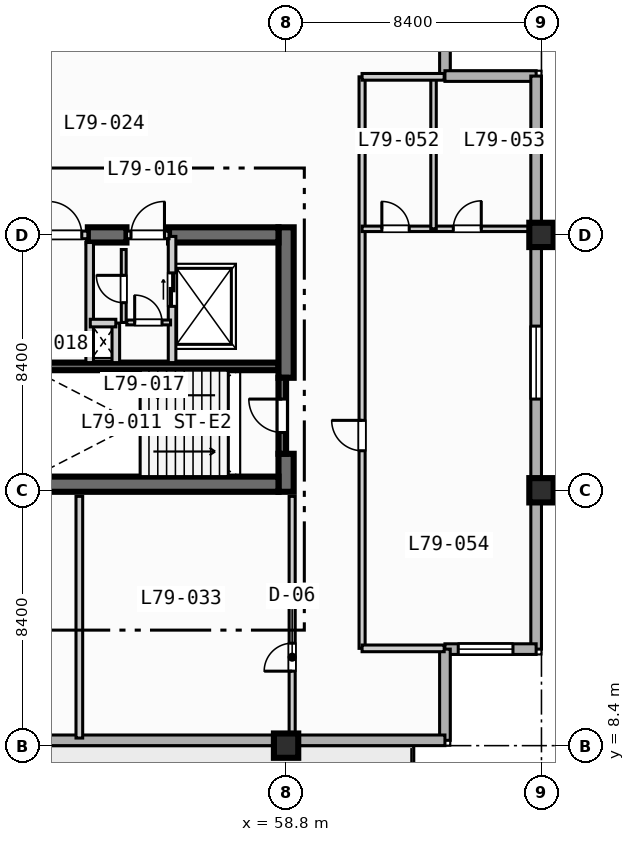
"""IFC4 building model, lengths in metres.
Left out: names, types, materials, properties, quantities, classifications, styles, units other than length and angle.
Written with IfcOpenShell. Run it as: python <this file> out.ifc"""

import sys

from ifc_helpers import new_model, si_unit, direction, frame, frame_2d, origin, origin_2d, place, context, subcontext, project, spatial, rectangle, extrude, element, fill, save


model = new_model("IFC4")
c1 = context("Model", 3, precision=1e-05, world=origin(), true_north=direction((0.0, 1.0)))
c2 = subcontext(c1, "Body", "Model", "MODEL_VIEW")
j1 = project(units=[si_unit("LENGTHUNIT", "METRE"), si_unit("PLANEANGLEUNIT", "RADIAN")], contexts=[c1])
p1 = place(None, origin())
s1 = spatial("IfcSite", under=j1, at=p1, CompositionType="ELEMENT")
p2 = place(p1, origin())
s2 = spatial("IfcBuilding", under=s1, at=p2, CompositionType="ELEMENT")
p3 = place(p2, frame((0.0, 0.0, 320.3)))
s3 = spatial("IfcBuildingStorey", under=s2, at=p3, CompositionType="ELEMENT", Elevation=320.3)
p4 = place(p3, frame((50.5, 20.875, 0.0), z_axis=(0.0, 0.0, 1.0), x_axis=(1.0, 0.0, 0.0)))
e1 = element("IfcWall", 1, at=p4, inside=s3, PredefinedType="SOLIDWALL", context=c2, shape_type="SweptSolid", body=[
    extrude(rectangle(XDim=8.05, YDim=0.25, at=frame_2d((4.025, 0.0))), origin(), (0.0, 0.0, 1.0), 3.67),
])
p5 = place(p3, frame((58.8, 16.75, 0.0), z_axis=(0.0, 0.0, 1.0), x_axis=(0.0, 1.0, 0.0)))
e2 = element("IfcWall", 2, at=p5, inside=s3, PredefinedType="SHEAR", context=c2, shape_type="SweptSolid", body=[
    extrude(rectangle(XDim=1.25, YDim=0.5, at=frame_2d((0.625, 0.0))), origin(), (0.0, 0.0, 1.0), 3.67),
])
p6 = place(p3, frame((58.8, 20.5, 0.0), z_axis=(0.0, 0.0, 1.0), x_axis=(0.0, 1.0, 0.0)))
e3 = element("IfcWall", 3, at=p6, inside=s3, PredefinedType="SHEAR", context=c2, shape_type="SweptSolid", body=[
    extrude(rectangle(XDim=4.95, YDim=0.5, at=frame_2d((2.475, 0.0))), origin(), (0.0, 0.0, 1.0), 3.67),
])
p7 = place(p3, frame((42.2, 17.0, 0.0), z_axis=(0.0, 0.0, 1.0), x_axis=(1.0, 0.0, 0.0)))
e4 = element("IfcWall", 4, at=p7, inside=s3, PredefinedType="SHEAR", context=c2, shape_type="SweptSolid", body=[
    extrude(rectangle(XDim=16.35, YDim=0.5, at=frame_2d((8.175, 0.0))), origin(), (0.0, 0.0, 1.0), 3.67),
])
p8 = place(p3, frame((52.28, 25.2, 0.0), z_axis=(0.0, 0.0, 1.0), x_axis=(1.0, 0.0, 0.0)))
e5 = element("IfcWall", 5, at=p8, inside=s3, PredefinedType="SHEAR", context=c2, shape_type="SweptSolid", body=[
    extrude(rectangle(XDim=1.27, YDim=0.5, at=frame_2d((0.635, 0.0))), origin(), (0.0, 0.0, 1.0), 3.67),
])
p9 = place(p3, frame((54.95, 25.2, 0.0), z_axis=(0.0, 0.0, 1.0), x_axis=(1.0, 0.0, 0.0)))
e6 = element("IfcWall", 6, at=p9, inside=s3, PredefinedType="SHEAR", context=c2, shape_type="SweptSolid", body=[
    extrude(rectangle(XDim=3.6, YDim=0.5, at=frame_2d((1.8, 0.0))), origin(), (0.0, 0.0, 1.0), 3.67),
])
for number, where, z_axis, x_axis in (
    (7, (58.8, 8.4, 0.0), (0.0, 0.0, 1.0), (1.0, 0.0, 0.0)),
    (8, (67.2, 16.8, 0.0), (0.0, 0.0, 1.0), (1.0, 0.0, 0.0)),
    (9, (67.2, 25.2, 0.0), (0.0, 0.0, 1.0), (1.0, 0.0, 0.0)),
):
    element("IfcColumn", number, at=place(p3, frame(where, z_axis=z_axis, x_axis=x_axis)), inside=s3, PredefinedType="COLUMN", context=c2, shape_type="SweptSolid", body=[
        extrude(rectangle(XDim=0.8, YDim=0.8, at=origin_2d()), origin(), (0.0, 0.0, 1.0), 3.9),
    ])
for number, where, z_axis, x_axis in (
    (10, (64.025, 33.425, 0.0), (0.0, 0.0, 1.0), (0.0, -1.0, 0.0)),
    (11, (64.025, 30.425, 0.0), (0.0, 0.0, 1.0), (1.0, 0.0, 0.0)),
):
    element("IfcWall", number, at=place(p3, frame(where, z_axis=z_axis, x_axis=x_axis)), inside=s3, PredefinedType="STANDARD", context=c2, shape_type="SweptSolid", body=[
        extrude(rectangle(XDim=3.0, YDim=0.35, at=frame_2d((1.5, 0.0))), origin(), (0.0, 0.0, 1.0), 3.67),
    ])
p10 = place(p3, frame((67.025, 30.425, 0.0), z_axis=(0.0, 0.0, 1.0), x_axis=(0.0, -1.0, 0.0)))
e12 = element("IfcWall", 12, at=p10, inside=s3, PredefinedType="STANDARD", context=c2, shape_type="SweptSolid", body=[
    extrude(rectangle(XDim=18.85, YDim=0.35, at=frame_2d((9.425, 0.0))), origin(), (0.0, 0.0, 1.0), 3.67),
])
p11 = place(p10, frame((8.225, 0.0, 0.85)))
e13 = element("IfcOpeningElement", 13, at=p11, cuts=e12, PredefinedType="OPENING", context=c2, shape_type="SweptSolid", body=[
    extrude(rectangle(XDim=2.4, YDim=1.95, at=frame_2d((1.2, 0.975))), frame((0.0, 0.185, 0.0), z_axis=(0.0, -1.0, 0.0), x_axis=(1.0, 0.0, 0.0)), (0.0, 0.0, 1.0), 0.37),
])
p12 = place(p3, frame((67.025, 11.575, 0.0), z_axis=(0.0, 0.0, 1.0), x_axis=(-1.0, 0.0, 0.0)))
e14 = element("IfcWall", 14, at=p12, inside=s3, PredefinedType="STANDARD", context=c2, shape_type="SweptSolid", body=[
    extrude(rectangle(XDim=3.0, YDim=0.35, at=frame_2d((1.5, 0.0))), origin(), (0.0, 0.0, 1.0), 3.67),
])
p13 = place(p12, frame((0.762, 0.0, 0.85)))
e15 = element("IfcOpeningElement", 15, at=p13, cuts=e14, PredefinedType="OPENING", context=c2, shape_type="SweptSolid", body=[
    extrude(rectangle(XDim=1.8, YDim=1.8, at=frame_2d((0.9, 0.9))), frame((0.0, 0.185, 0.0), z_axis=(0.0, -1.0, 0.0), x_axis=(1.0, 0.0, 0.0)), (0.0, 0.0, 1.0), 0.37),
])
p14 = place(p3, frame((64.025, 11.575, 0.0), z_axis=(0.0, 0.0, 1.0), x_axis=(0.0, -1.0, 0.0)))
e16 = element("IfcWall", 16, at=p14, inside=s3, PredefinedType="STANDARD", context=c2, shape_type="SweptSolid", body=[
    extrude(rectangle(XDim=3.0, YDim=0.35, at=frame_2d((1.5, 0.0))), origin(), (0.0, 0.0, 1.0), 3.67),
])
p15 = place(p3, frame((64.025, 8.575, 0.0), z_axis=(0.0, 0.0, 1.0), x_axis=(-1.0, 0.0, 0.0)))
e17 = element("IfcWall", 17, at=p15, inside=s3, PredefinedType="STANDARD", context=c2, shape_type="SweptSolid", body=[
    extrude(rectangle(XDim=52.45, YDim=0.35, at=frame_2d((26.225, 0.0))), origin(), (0.0, 0.0, 1.0), 3.67),
])
p16 = place(p15, frame((33.925, 0.0, 0.0)))
e18 = element("IfcOpeningElement", 18, at=p16, cuts=e17, PredefinedType="OPENING", context=c2, shape_type="SweptSolid", body=[
    extrude(rectangle(XDim=1.4, YDim=2.2, at=frame_2d((0.7, 1.1))), frame((0.0, 0.185, 0.0), z_axis=(0.0, -1.0, 0.0), x_axis=(1.0, 0.0, 0.0)), (0.0, 0.0, 1.0), 0.37),
])
p17 = place(p15, frame((41.825, 0.0, 0.85)))
e19 = element("IfcOpeningElement", 19, at=p17, cuts=e17, PredefinedType="OPENING", context=c2, shape_type="SweptSolid", body=[
    extrude(rectangle(XDim=2.4, YDim=1.95, at=frame_2d((1.2, 0.975))), frame((0.0, 0.185, 0.0), z_axis=(0.0, -1.0, 0.0), x_axis=(1.0, 0.0, 0.0)), (0.0, 0.0, 1.0), 0.37),
])
p18 = place(p15, frame((25.025, 0.0, 0.85)))
e20 = element("IfcOpeningElement", 20, at=p18, cuts=e17, PredefinedType="OPENING", context=c2, shape_type="SweptSolid", body=[
    extrude(rectangle(XDim=2.4, YDim=1.95, at=frame_2d((1.2, 0.975))), frame((0.0, 0.185, 0.0), z_axis=(0.0, -1.0, 0.0), x_axis=(1.0, 0.0, 0.0)), (0.0, 0.0, 1.0), 0.37),
])
p19 = place(p15, frame((16.925, 0.0, 0.85)))
e21 = element("IfcOpeningElement", 21, at=p19, cuts=e17, PredefinedType="OPENING", context=c2, shape_type="SweptSolid", body=[
    extrude(rectangle(XDim=1.8, YDim=1.8, at=frame_2d((0.9, 0.9))), frame((0.0, 0.185, 0.0), z_axis=(0.0, -1.0, 0.0), x_axis=(1.0, 0.0, 0.0)), (0.0, 0.0, 1.0), 0.37),
])
p20 = place(p15, frame((50.275, 0.0, 0.85)))
e22 = element("IfcOpeningElement", 22, at=p20, cuts=e17, PredefinedType="OPENING", context=c2, shape_type="SweptSolid", body=[
    extrude(rectangle(XDim=1.8, YDim=1.8, at=frame_2d((0.9, 0.9))), frame((0.0, 0.185, 0.0), z_axis=(0.0, -1.0, 0.0), x_axis=(1.0, 0.0, 0.0)), (0.0, 0.0, 1.0), 0.37),
])
p21 = place(p3, frame((58.675, 18.0, 0.0), z_axis=(0.0, 0.0, 1.0), x_axis=(0.0, 1.0, 0.0)))
e23 = element("IfcWall", 23, at=p21, inside=s3, PredefinedType="SOLIDWALL", context=c2, shape_type="SweptSolid", body=[
    extrude(rectangle(XDim=2.5, YDim=0.25, at=frame_2d((1.25, 0.0))), origin(), (0.0, 0.0, 1.0), 3.67),
])
p22 = place(p21, frame((0.7, 0.0, 0.0)))
e24 = element("IfcOpeningElement", 24, at=p22, cuts=e23, PredefinedType="OPENING", context=c2, shape_type="SweptSolid", body=[
    extrude(rectangle(XDim=1.1, YDim=2.15, at=frame_2d((0.55, 1.075))), frame((0.0, 0.135, 0.0), z_axis=(0.0, -1.0, 0.0), x_axis=(1.0, 0.0, 0.0)), (0.0, 0.0, 1.0), 0.27),
])
p23 = place(p3, frame((50.8, 25.2, 0.0), z_axis=(0.0, 0.0, 1.0), x_axis=(1.0, 0.0, 0.0)))
e25 = element("IfcWall", 25, at=p23, inside=s3, PredefinedType="SOLIDWALL", context=c2, shape_type="SweptSolid", body=[
    extrude(rectangle(XDim=1.48, YDim=0.25, at=frame_2d((0.74, 0.0))), origin(), (0.0, 0.0, 1.0), 3.67),
])
p24 = place(p23, frame((0.18, 0.0, 0.0)))
e26 = element("IfcOpeningElement", 26, at=p24, cuts=e25, PredefinedType="OPENING", context=c2, shape_type="SweptSolid", body=[
    extrude(rectangle(XDim=1.1, YDim=2.15, at=frame_2d((0.55, 1.075))), frame((0.0, 0.135, 0.0), z_axis=(0.0, -1.0, 0.0), x_axis=(1.0, 0.0, 0.0)), (0.0, 0.0, 1.0), 0.27),
])
p25 = place(p3, frame((52.34, 21.0, 0.0), z_axis=(0.0, 0.0, 1.0), x_axis=(0.0, 1.0, 0.0)))
e27 = element("IfcWall", 27, at=p25, inside=s3, PredefinedType="SOLIDWALL", context=c2, shape_type="SweptSolid", body=[
    extrude(rectangle(XDim=3.95, YDim=0.25, at=frame_2d((1.975, 0.0))), origin(), (0.0, 0.0, 1.0), 3.67),
])
p26 = place(p3, frame((55.05, 21.0, 0.0), z_axis=(0.0, 0.0, 1.0), x_axis=(0.0, 1.0, 0.0)))
e28 = element("IfcWall", 28, at=p26, inside=s3, PredefinedType="SOLIDWALL", context=c2, shape_type="SweptSolid", body=[
    extrude(rectangle(XDim=4.15, YDim=0.25, at=frame_2d((2.075, 0.0))), origin(), (0.0, 0.0, 1.0), 3.67),
])
p27 = place(p26, frame((1.85, 0.0, 0.0)))
e29 = element("IfcOpeningElement", 29, at=p27, cuts=e28, PredefinedType="OPENING", context=c2, shape_type="SweptSolid", body=[
    extrude(rectangle(XDim=1.1, YDim=2.15, at=frame_2d((0.55, 1.075))), frame((0.0, 0.135, 0.0), z_axis=(0.0, -1.0, 0.0), x_axis=(1.0, 0.0, 0.0)), (0.0, 0.0, 1.0), 0.27),
])
p28 = place(p3, frame((53.55, 25.2, 0.0), z_axis=(0.0, 0.0, 1.0), x_axis=(1.0, 0.0, 0.0)))
e30 = element("IfcWall", 30, at=p28, inside=s3, PredefinedType="SOLIDWALL", context=c2, shape_type="SweptSolid", body=[
    extrude(rectangle(XDim=1.4, YDim=0.25, at=frame_2d((0.7, 0.0))), origin(), (0.0, 0.0, 1.0), 3.67),
])
p29 = place(p28, frame((0.15, 0.0, 0.0)))
e31 = element("IfcOpeningElement", 31, at=p29, cuts=e30, PredefinedType="OPENING", context=c2, shape_type="SweptSolid", body=[
    extrude(rectangle(XDim=1.1, YDim=2.15, at=frame_2d((0.55, 1.075))), frame((0.0, 0.135, 0.0), z_axis=(0.0, -1.0, 0.0), x_axis=(1.0, 0.0, 0.0)), (0.0, 0.0, 1.0), 0.27),
])
p30 = place(p3, frame((53.2, 21.0, 0.0), z_axis=(0.0, 0.0, 1.0), x_axis=(0.0, 1.0, 0.0)))
e32 = element("IfcWall", 32, at=p30, inside=s3, PredefinedType="SOLIDWALL", context=c2, shape_type="SweptSolid", body=[
    extrude(rectangle(XDim=1.3, YDim=0.25, at=frame_2d((0.65, 0.0))), origin(), (0.0, 0.0, 1.0), 3.67),
])
p31 = place(p3, frame((52.36, 22.3, 0.0), z_axis=(0.0, 0.0, 1.0), x_axis=(1.0, 0.0, 0.0)))
e33 = element("IfcWall", 33, at=p31, inside=s3, PredefinedType="SOLIDWALL", context=c2, shape_type="SweptSolid", body=[
    extrude(rectangle(XDim=0.84, YDim=0.25, at=frame_2d((0.42, 0.0))), origin(), (0.0, 0.0, 1.0), 3.67),
])
p32 = place(p3, frame((53.56, 22.32, 0.0), z_axis=(0.0, 0.0, 1.0), x_axis=(1.0, 0.0, 0.0)))
e34 = element("IfcWall", 34, at=p32, inside=s3, PredefinedType="PARTITIONING", context=c2, shape_type="SweptSolid", body=[
    extrude(rectangle(XDim=1.44, YDim=0.16, at=frame_2d((0.72, 0.0))), origin(), (0.0, 0.0, 1.0), 3.67),
])
p33 = place(p32, frame((0.26, 0.0, 0.0)))
e35 = element("IfcOpeningElement", 35, at=p33, cuts=e34, PredefinedType="OPENING", context=c2, shape_type="SweptSolid", body=[
    extrude(rectangle(XDim=0.9, YDim=2.1, at=frame_2d((0.45, 1.05))), frame((0.0, 0.09, 0.0), z_axis=(0.0, -1.0, 0.0), x_axis=(1.0, 0.0, 0.0)), (0.0, 0.0, 1.0), 0.18),
])
p34 = place(p3, frame((53.46, 22.32, 0.0), z_axis=(0.0, 0.0, 1.0), x_axis=(0.0, 1.0, 0.0)))
e36 = element("IfcWall", 36, at=p34, inside=s3, PredefinedType="PARTITIONING", context=c2, shape_type="SweptSolid", body=[
    extrude(rectangle(XDim=2.4, YDim=0.16, at=frame_2d((1.2, 0.0))), origin(), (0.0, 0.0, 1.0), 3.67),
])
p35 = place(p34, frame((0.65, 0.0, 0.0)))
e37 = element("IfcOpeningElement", 37, at=p35, cuts=e36, PredefinedType="OPENING", context=c2, shape_type="SweptSolid", body=[
    extrude(rectangle(XDim=0.9, YDim=2.1, at=frame_2d((0.45, 1.05))), frame((0.0, 0.09, 0.0), z_axis=(0.0, -1.0, 0.0), x_axis=(1.0, 0.0, 0.0)), (0.0, 0.0, 1.0), 0.18),
])
p36 = place(p3, frame((59.0, 8.65, 0.0), z_axis=(0.0, 0.0, 1.0), x_axis=(0.0, 1.0, 0.0)))
e38 = element("IfcWall", 38, at=p36, inside=s3, PredefinedType="PARTITIONING", context=c2, shape_type="SweptSolid", body=[
    extrude(rectangle(XDim=7.95, YDim=0.2, at=frame_2d((3.975, 0.0))), origin(), (0.0, 0.0, 1.0), 3.07),
])
p37 = place(p36, frame((2.2, 0.0, 0.0)))
e39 = element("IfcOpeningElement", 39, at=p37, cuts=e38, PredefinedType="OPENING", context=c2, shape_type="SweptSolid", body=[
    extrude(rectangle(XDim=0.92, YDim=2.1, at=frame_2d((0.46, 1.05))), frame((0.0, 0.11, 0.0), z_axis=(0.0, -1.0, 0.0), x_axis=(1.0, 0.0, 0.0)), (0.0, 0.0, 1.0), 0.22),
])
p38 = place(p3, frame((52.0, 8.65, 0.0), z_axis=(0.0, 0.0, 1.0), x_axis=(0.0, 1.0, 0.0)))
e40 = element("IfcWall", 40, at=p38, inside=s3, PredefinedType="PARTITIONING", context=c2, shape_type="SweptSolid", body=[
    extrude(rectangle(XDim=7.95, YDim=0.22, at=frame_2d((3.975, 0.0))), origin(), (0.0, 0.0, 1.0), 3.67),
])
p39 = place(p3, frame((61.3, 11.6, 0.0), z_axis=(0.0, 0.0, 1.0), x_axis=(0.0, 1.0, 0.0)))
e41 = element("IfcWall", 41, at=p39, inside=s3, PredefinedType="PARTITIONING", context=c2, shape_type="SweptSolid", body=[
    extrude(rectangle(XDim=18.8, YDim=0.2, at=frame_2d((9.4, 0.0))), origin(), (0.0, 0.0, 1.0), 3.67),
])
p40 = place(p39, frame((6.5, 0.0, 0.0)))
e42 = element("IfcOpeningElement", 42, at=p40, cuts=e41, PredefinedType="OPENING", context=c2, shape_type="SweptSolid", body=[
    extrude(rectangle(XDim=1.0, YDim=2.15, at=frame_2d((0.5, 1.075))), frame((0.0, 0.11, 0.0), z_axis=(0.0, -1.0, 0.0), x_axis=(1.0, 0.0, 0.0)), (0.0, 0.0, 1.0), 0.22),
])
p41 = place(p3, frame((61.3, 25.4, 0.0), z_axis=(0.0, 0.0, 1.0), x_axis=(1.0, 0.0, 0.0)))
e43 = element("IfcWall", 43, at=p41, inside=s3, PredefinedType="PLUMBINGWALL", context=c2, shape_type="SweptSolid", body=[
    extrude(rectangle(XDim=5.5, YDim=0.18, at=frame_2d((2.75, 0.0))), origin(), (0.0, 0.0, 1.0), 3.253),
])
p42 = place(p41, frame((0.65, 0.0, 0.0)))
e44 = element("IfcOpeningElement", 44, at=p42, cuts=e43, PredefinedType="OPENING", context=c2, shape_type="SweptSolid", body=[
    extrude(rectangle(XDim=0.9, YDim=2.1, at=frame_2d((0.45, 1.05))), frame((0.0, 0.1, 0.0), z_axis=(0.0, -1.0, 0.0), x_axis=(1.0, 0.0, 0.0)), (0.0, 0.0, 1.0), 0.2),
])
p43 = place(p41, frame((3.0, 0.0, 0.0)))
e45 = element("IfcOpeningElement", 45, at=p43, cuts=e43, PredefinedType="OPENING", context=c2, shape_type="SweptSolid", body=[
    extrude(rectangle(XDim=0.92, YDim=2.1, at=frame_2d((0.46, 1.05))), frame((0.0, 0.1, 0.0), z_axis=(0.0, -1.0, 0.0), x_axis=(1.0, 0.0, 0.0)), (0.0, 0.0, 1.0), 0.2),
])
p44 = place(p3, frame((63.65, 25.4, 0.0), z_axis=(0.0, 0.0, 1.0), x_axis=(0.0, 1.0, 0.0)))
e46 = element("IfcWall", 46, at=p44, inside=s3, PredefinedType="PLUMBINGWALL", context=c2, shape_type="SweptSolid", body=[
    extrude(rectangle(XDim=5.0, YDim=0.18, at=frame_2d((2.5, 0.0))), origin(), (0.0, 0.0, 1.0), 3.67),
])
for number, where, z_axis, x_axis in (
    (47, (61.3, 11.6, 0.0), (0.0, 0.0, 1.0), (1.0, 0.0, 0.0)),
    (48, (61.3, 30.4, 0.0), (0.0, 0.0, 1.0), (1.0, 0.0, 0.0)),
):
    element("IfcWall", number, at=place(p3, frame(where, z_axis=z_axis, x_axis=x_axis)), inside=s3, PredefinedType="PARTITIONING", context=c2, shape_type="SweptSolid", body=[
        extrude(rectangle(XDim=2.7, YDim=0.22, at=frame_2d((1.35, 0.0))), origin(), (0.0, 0.0, 1.0), 3.67),
    ])
p45 = place(p11, origin())
e49 = element("IfcWindow", 49, at=p45, inside=s3, PartitioningType="SINGLE_PANEL", PredefinedType="WINDOW", context=c2, shape_type="SweptSolid", body=[
    extrude(rectangle(XDim=2.4, YDim=1.95, at=frame_2d((1.2, 0.975))), frame((0.0, 0.03, 0.0), z_axis=(0.0, -1.0, 0.0), x_axis=(1.0, 0.0, 0.0)), (0.0, 0.0, 1.0), 0.06),
])
fill(e13, e49)
p46 = place(p13, origin())
e50 = element("IfcWindow", 50, at=p46, inside=s3, PartitioningType="SINGLE_PANEL", PredefinedType="WINDOW", context=c2, shape_type="SweptSolid", body=[
    extrude(rectangle(XDim=1.8, YDim=1.8, at=frame_2d((0.9, 0.9))), frame((0.0, 0.03, 0.0), z_axis=(0.0, -1.0, 0.0), x_axis=(1.0, 0.0, 0.0)), (0.0, 0.0, 1.0), 0.06),
])
fill(e15, e50)
p47 = place(p22, origin())
e51 = element("IfcDoor", 51, at=p47, inside=s3, OperationType="SINGLE_SWING_RIGHT", PredefinedType="DOOR", context=c2, shape_type="SweptSolid", body=[
    extrude(rectangle(XDim=1.1, YDim=2.15, at=frame_2d((0.55, 1.075))), frame((0.0, 0.025, 0.0), z_axis=(0.0, -1.0, 0.0), x_axis=(1.0, 0.0, 0.0)), (0.0, 0.0, 1.0), 0.05),
])
fill(e24, e51)
p48 = place(p24, origin())
e52 = element("IfcDoor", 52, at=p48, inside=s3, OperationType="SINGLE_SWING_LEFT", PredefinedType="DOOR", context=c2, shape_type="SweptSolid", body=[
    extrude(rectangle(XDim=1.1, YDim=2.15, at=frame_2d((0.55, 1.075))), frame((0.0, 0.025, 0.0), z_axis=(0.0, -1.0, 0.0), x_axis=(1.0, 0.0, 0.0)), (0.0, 0.0, 1.0), 0.05),
])
fill(e26, e52)
p49 = place(p27, origin())
e53 = element("IfcDoor", 53, at=p49, inside=s3, OperationType="SLIDING_TO_LEFT", PredefinedType="DOOR", context=c2, shape_type="SweptSolid", body=[
    extrude(rectangle(XDim=1.1, YDim=2.15, at=frame_2d((0.55, 1.075))), frame((0.0, 0.025, 0.0), z_axis=(0.0, -1.0, 0.0), x_axis=(1.0, 0.0, 0.0)), (0.0, 0.0, 1.0), 0.05),
])
fill(e29, e53)
p50 = place(p29, origin())
e54 = element("IfcDoor", 54, at=p50, inside=s3, OperationType="SINGLE_SWING_RIGHT", PredefinedType="DOOR", context=c2, shape_type="SweptSolid", body=[
    extrude(rectangle(XDim=1.1, YDim=2.15, at=frame_2d((0.55, 1.075))), frame((0.0, 0.025, 0.0), z_axis=(0.0, -1.0, 0.0), x_axis=(1.0, 0.0, 0.0)), (0.0, 0.0, 1.0), 0.05),
])
fill(e31, e54)
p51 = place(p33, origin())
e55 = element("IfcDoor", 55, at=p51, inside=s3, OperationType="SINGLE_SWING_LEFT", PredefinedType="DOOR", context=c2, shape_type="SweptSolid", body=[
    extrude(rectangle(XDim=0.9, YDim=2.1, at=frame_2d((0.45, 1.05))), frame((0.0, 0.025, 0.0), z_axis=(0.0, -1.0, 0.0), x_axis=(1.0, 0.0, 0.0)), (0.0, 0.0, 1.0), 0.05),
])
fill(e35, e55)
p52 = place(p35, origin())
e56 = element("IfcDoor", 56, at=p52, inside=s3, OperationType="SINGLE_SWING_RIGHT", PredefinedType="DOOR", context=c2, shape_type="SweptSolid", body=[
    extrude(rectangle(XDim=0.9, YDim=2.1, at=frame_2d((0.45, 1.05))), frame((0.0, 0.025, 0.0), z_axis=(0.0, -1.0, 0.0), x_axis=(1.0, 0.0, 0.0)), (0.0, 0.0, 1.0), 0.05),
])
fill(e37, e56)
p53 = place(p37, origin())
e57 = element("IfcDoor", 57, at=p53, inside=s3, OperationType="SINGLE_SWING_LEFT", PredefinedType="DOOR", context=c2, shape_type="SweptSolid", body=[
    extrude(rectangle(XDim=0.92, YDim=2.1, at=frame_2d((0.46, 1.05))), frame((0.0, 0.025, 0.0), z_axis=(0.0, -1.0, 0.0), x_axis=(1.0, 0.0, 0.0)), (0.0, 0.0, 1.0), 0.05),
])
fill(e39, e57)
p54 = place(p40, origin())
e58 = element("IfcDoor", 58, at=p54, inside=s3, OperationType="SINGLE_SWING_RIGHT", PredefinedType="DOOR", context=c2, shape_type="SweptSolid", body=[
    extrude(rectangle(XDim=1.0, YDim=2.15, at=frame_2d((0.5, 1.075))), frame((0.0, 0.025, 0.0), z_axis=(0.0, -1.0, 0.0), x_axis=(1.0, 0.0, 0.0)), (0.0, 0.0, 1.0), 0.05),
])
fill(e42, e58)
p55 = place(p42, origin())
e59 = element("IfcDoor", 59, at=p55, inside=s3, OperationType="SINGLE_SWING_LEFT", PredefinedType="DOOR", context=c2, shape_type="SweptSolid", body=[
    extrude(rectangle(XDim=0.9, YDim=2.1, at=frame_2d((0.45, 1.05))), frame((0.0, 0.025, 0.0), z_axis=(0.0, -1.0, 0.0), x_axis=(1.0, 0.0, 0.0)), (0.0, 0.0, 1.0), 0.05),
])
fill(e44, e59)
p56 = place(p43, origin())
e60 = element("IfcDoor", 60, at=p56, inside=s3, OperationType="SINGLE_SWING_RIGHT", PredefinedType="DOOR", context=c2, shape_type="SweptSolid", body=[
    extrude(rectangle(XDim=0.92, YDim=2.1, at=frame_2d((0.46, 1.05))), frame((0.0, 0.025, 0.0), z_axis=(0.0, -1.0, 0.0), x_axis=(1.0, 0.0, 0.0)), (0.0, 0.0, 1.0), 0.05),
])
fill(e45, e60)
save(model, sys.argv[1])
